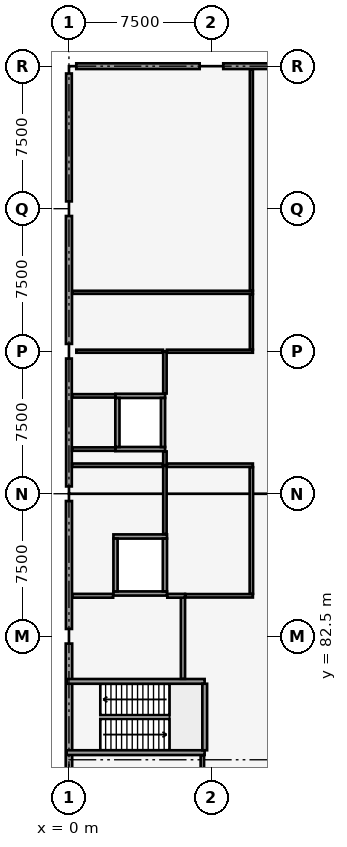
"""IFC4 building model, lengths in metres.
Left out: names, types, materials, properties, quantities, classifications, styles, units other than length and angle.
Written with IfcOpenShell. Run it as: python <this file> out.ifc"""

import sys

from ifc_helpers import new_model, si_unit, direction, frame, frame_2d, origin, origin_2d, place, context, subcontext, project, spatial, rectangle, extrude, element, fill, save


model = new_model("IFC4")
c1 = context("Model", 3, precision=1e-05, world=origin(), true_north=direction((0.0, 1.0)))
c2 = subcontext(c1, "Body", "Model", "MODEL_VIEW")
j1 = project(units=[si_unit("LENGTHUNIT", "METRE"), si_unit("PLANEANGLEUNIT", "RADIAN")], contexts=[c1])
p1 = place(None, origin())
s1 = spatial("IfcSite", under=j1, at=p1, CompositionType="ELEMENT")
p2 = place(p1, origin())
s2 = spatial("IfcBuilding", under=s1, at=p2, CompositionType="ELEMENT")
p3 = place(p2, origin())
s3 = spatial("IfcBuildingStorey", under=s2, at=p3, CompositionType="ELEMENT", Elevation=0.0)
for number, where, z_axis, x_axis in (
    (1, (0.0, 82.5, 0.0), (0.0, 0.0, 1.0), (1.0, 0.0, 0.0)),
    (2, (0.0, 90.0, 0.0), (0.0, 0.0, 1.0), (1.0, 0.0, 0.0)),
    (3, (0.0, 97.5, 0.0), (0.0, 0.0, 1.0), (1.0, 0.0, 0.0)),
    (4, (0.0, 105.0, 0.0), (0.0, 0.0, 1.0), (1.0, 0.0, 0.0)),
    (5, (0.0, 112.5, 0.0), (0.0, 0.0, 1.0), (1.0, 0.0, 0.0)),
):
    element("IfcColumn", number, at=place(p3, frame(where, z_axis=z_axis, x_axis=x_axis)), inside=s3, PredefinedType="COLUMN", context=c2, shape_type="SweptSolid", body=[
        extrude(rectangle(XDim=0.75, YDim=0.75, at=origin_2d()), origin(), (0.0, 0.0, 1.0), 4.8),
    ])
p4 = place(p3, frame((0.0, 101.25, 0.0), z_axis=(0.0, 0.0, 1.0), x_axis=(1.0, 0.0, 0.0)))
e6 = element("IfcColumn", 6, at=p4, inside=s3, PredefinedType="PILASTER", context=c2, shape_type="SweptSolid", body=[
    extrude(rectangle(XDim=0.45, YDim=0.85, at=origin_2d()), origin(), (0.0, 0.0, 1.0), 4.8),
])
p5 = place(p3, frame((0.385, 112.5, 0.0), z_axis=(0.0, 0.0, 1.0), x_axis=(1.0, 0.0, 0.0)))
e7 = element("IfcWall", 7, at=p5, inside=s3, PredefinedType="SOLIDWALL", context=c2, shape_type="SweptSolid", body=[
    extrude(rectangle(XDim=6.495, YDim=0.3, at=frame_2d((3.248, 0.0))), origin(), (0.0, 0.0, 1.0), 2.97),
])
p6 = place(p5, frame((2.815, 0.0, 0.6)))
e8 = element("IfcOpeningElement", 8, at=p6, cuts=e7, PredefinedType="OPENING", context=c2, shape_type="SweptSolid", body=[
    extrude(rectangle(XDim=1.1, YDim=1.8, at=frame_2d((0.55, 0.9))), frame((0.0, 0.16, 0.0), z_axis=(0.0, -1.0, 0.0), x_axis=(1.0, 0.0, 0.0)), (0.0, 0.0, 1.0), 0.32),
])
p7 = place(p3, frame((8.12, 112.5, 0.0), z_axis=(0.0, 0.0, 1.0), x_axis=(1.0, 0.0, 0.0)))
e9 = element("IfcWall", 9, at=p7, inside=s3, PredefinedType="SOLIDWALL", context=c2, shape_type="SweptSolid", body=[
    extrude(rectangle(XDim=6.495, YDim=0.3, at=frame_2d((3.248, 0.0))), origin(), (0.0, 0.0, 1.0), 2.97),
])
p8 = place(p7, frame((2.505, 0.0, 0.6)))
e10 = element("IfcOpeningElement", 10, at=p8, cuts=e9, PredefinedType="OPENING", context=c2, shape_type="SweptSolid", body=[
    extrude(rectangle(XDim=1.25, YDim=1.8, at=frame_2d((0.625, 0.9))), frame((0.0, 0.16, 0.0), z_axis=(0.0, -1.0, 0.0), x_axis=(1.0, 0.0, 0.0)), (0.0, 0.0, 1.0), 0.32),
])
p9 = place(p3, frame((0.0, 75.385, 0.0), z_axis=(0.0, 0.0, 1.0), x_axis=(0.0, 1.0, 0.0)))
e11 = element("IfcWall", 11, at=p9, inside=s3, PredefinedType="SOLIDWALL", context=c2, shape_type="SweptSolid", body=[
    extrude(rectangle(XDim=6.73, YDim=0.34, at=frame_2d((3.365, 0.0))), origin(), (0.0, 0.0, 1.0), 2.97),
])
p10 = place(p9, frame((2.152, 0.0, 0.0)))
e12 = element("IfcOpeningElement", 12, at=p10, cuts=e11, PredefinedType="OPENING", context=c2, shape_type="SweptSolid", body=[
    extrude(rectangle(XDim=1.8, YDim=2.2, at=frame_2d((0.9, 1.1))), frame((0.0, 0.18, 0.0), z_axis=(0.0, -1.0, 0.0), x_axis=(1.0, 0.0, 0.0)), (0.0, 0.0, 1.0), 0.36),
])
p11 = place(p3, frame((0.0, 82.885, 0.0), z_axis=(0.0, 0.0, 1.0), x_axis=(0.0, 1.0, 0.0)))
e13 = element("IfcWall", 13, at=p11, inside=s3, PredefinedType="SOLIDWALL", context=c2, shape_type="SweptSolid", body=[
    extrude(rectangle(XDim=6.73, YDim=0.32, at=frame_2d((3.365, 0.0))), origin(), (0.0, 0.0, 1.0), 2.97),
])
p12 = place(p3, frame((0.0, 90.385, 0.0), z_axis=(0.0, 0.0, 1.0), x_axis=(0.0, 1.0, 0.0)))
e14 = element("IfcWall", 14, at=p12, inside=s3, PredefinedType="SOLIDWALL", context=c2, shape_type="SweptSolid", body=[
    extrude(rectangle(XDim=6.73, YDim=0.3, at=frame_2d((3.365, 0.0))), origin(), (0.0, 0.0, 1.0), 2.97),
])
p13 = place(p12, frame((2.665, 0.0, 0.6)))
e15 = element("IfcOpeningElement", 15, at=p13, cuts=e14, PredefinedType="OPENING", context=c2, shape_type="SweptSolid", body=[
    extrude(rectangle(XDim=1.4, YDim=1.8, at=frame_2d((0.7, 0.9))), frame((0.0, 0.16, 0.0), z_axis=(0.0, -1.0, 0.0), x_axis=(1.0, 0.0, 0.0)), (0.0, 0.0, 1.0), 0.32),
])
p14 = place(p12, frame((5.188, 0.0, 0.6)))
e16 = element("IfcOpeningElement", 16, at=p14, cuts=e14, PredefinedType="OPENING", context=c2, shape_type="SweptSolid", body=[
    extrude(rectangle(XDim=1.15, YDim=1.3, at=frame_2d((0.575, 0.65))), frame((0.0, 0.16, 0.0), z_axis=(0.0, -1.0, 0.0), x_axis=(1.0, 0.0, 0.0)), (0.0, 0.0, 1.0), 0.32),
])
p15 = place(p3, frame((0.0, 97.885, 0.0), z_axis=(0.0, 0.0, 1.0), x_axis=(0.0, 1.0, 0.0)))
e17 = element("IfcWall", 17, at=p15, inside=s3, PredefinedType="SOLIDWALL", context=c2, shape_type="SweptSolid", body=[
    extrude(rectangle(XDim=6.73, YDim=0.32, at=frame_2d((3.365, 0.0))), origin(), (0.0, 0.0, 1.0), 2.97),
])
p16 = place(p3, frame((0.0, 105.385, 0.0), z_axis=(0.0, 0.0, 1.0), x_axis=(0.0, 1.0, 0.0)))
e18 = element("IfcWall", 18, at=p16, inside=s3, PredefinedType="SOLIDWALL", context=c2, shape_type="SweptSolid", body=[
    extrude(rectangle(XDim=6.73, YDim=0.3, at=frame_2d((3.365, 0.0))), origin(), (0.0, 0.0, 1.0), 2.97),
])
p17 = place(p16, frame((0.95, 0.0, 0.6)))
e19 = element("IfcOpeningElement", 19, at=p17, cuts=e18, PredefinedType="OPENING", context=c2, shape_type="SweptSolid", body=[
    extrude(rectangle(XDim=1.7, YDim=1.8, at=frame_2d((0.85, 0.9))), frame((0.0, 0.16, 0.0), z_axis=(0.0, -1.0, 0.0), x_axis=(1.0, 0.0, 0.0)), (0.0, 0.0, 1.0), 0.32),
])
p18 = place(p16, frame((4.205, 0.0, 0.6)))
e20 = element("IfcOpeningElement", 20, at=p18, cuts=e18, PredefinedType="OPENING", context=c2, shape_type="SweptSolid", body=[
    extrude(rectangle(XDim=1.45, YDim=1.3, at=frame_2d((0.725, 0.65))), frame((0.0, 0.16, 0.0), z_axis=(0.0, -1.0, 0.0), x_axis=(1.0, 0.0, 0.0)), (0.0, 0.0, 1.0), 0.32),
])
p19 = place(p3, frame((-0.12, 76.375, 0.0), z_axis=(0.0, 0.0, 1.0), x_axis=(1.0, 0.0, 0.0)))
e21 = element("IfcWall", 21, at=p19, inside=s3, PredefinedType="SOLIDWALL", context=c2, shape_type="SweptSolid", body=[
    extrude(rectangle(XDim=7.26, YDim=0.25, at=frame_2d((3.63, 0.0))), origin(), (0.0, 0.0, 1.0), 4.5),
])
p20 = place(p3, frame((-0.12, 80.125, 0.0), z_axis=(0.0, 0.0, 1.0), x_axis=(1.0, 0.0, 0.0)))
e22 = element("IfcWall", 22, at=p20, inside=s3, PredefinedType="SOLIDWALL", context=c2, shape_type="SweptSolid", body=[
    extrude(rectangle(XDim=7.26, YDim=0.25, at=frame_2d((3.63, 0.0))), origin(), (0.0, 0.0, 1.0), 4.5),
])
p21 = place(p20, frame((0.45, 0.0, 0.0)))
e23 = element("IfcOpeningElement", 23, at=p21, cuts=e22, PredefinedType="OPENING", context=c2, shape_type="SweptSolid", body=[
    extrude(rectangle(XDim=1.1, YDim=2.15, at=frame_2d((0.55, 1.075))), frame((0.0, 0.135, 0.0), z_axis=(0.0, -1.0, 0.0), x_axis=(1.0, 0.0, 0.0)), (0.0, 0.0, 1.0), 0.27),
])
p22 = place(p3, frame((7.145, 76.5, 0.0), z_axis=(0.0, 0.0, 1.0), x_axis=(0.0, 1.0, 0.0)))
e24 = element("IfcWall", 24, at=p22, inside=s3, PredefinedType="SOLIDWALL", context=c2, shape_type="SweptSolid", body=[
    extrude(rectangle(XDim=3.5, YDim=0.25, at=frame_2d((1.75, 0.0))), origin(), (0.0, 0.0, 1.0), 4.5),
])
for number, where, z_axis, x_axis in (
    (25, (2.44, 92.35, 0.0), (0.0, 0.0, 1.0), (1.0, 0.0, 0.0)),
    (26, (2.44, 95.15, 0.0), (0.0, 0.0, 1.0), (1.0, 0.0, 0.0)),
):
    element("IfcWall", number, at=place(p3, frame(where, z_axis=z_axis, x_axis=x_axis)), inside=s3, PredefinedType="SOLIDWALL", context=c2, shape_type="SweptSolid", body=[
        extrude(rectangle(XDim=2.62, YDim=0.22, at=frame_2d((1.31, 0.0))), origin(), (0.0, 0.0, 1.0), 4.5),
    ])
p23 = place(p3, frame((2.55, 92.46, 0.0), z_axis=(0.0, 0.0, 1.0), x_axis=(0.0, 1.0, 0.0)))
e27 = element("IfcWall", 27, at=p23, inside=s3, PredefinedType="SOLIDWALL", context=c2, shape_type="SweptSolid", body=[
    extrude(rectangle(XDim=2.58, YDim=0.22, at=frame_2d((1.29, 0.0))), origin(), (0.0, 0.0, 1.0), 4.5),
])
p24 = place(p3, frame((4.95, 92.46, 0.0), z_axis=(0.0, 0.0, 1.0), x_axis=(0.0, 1.0, 0.0)))
e28 = element("IfcWall", 28, at=p24, inside=s3, PredefinedType="SOLIDWALL", context=c2, shape_type="SweptSolid", body=[
    extrude(rectangle(XDim=2.58, YDim=0.22, at=frame_2d((1.29, 0.0))), origin(), (0.0, 0.0, 1.0), 4.5),
])
p25 = place(p24, frame((0.79, 0.0, 0.0)))
e29 = element("IfcOpeningElement", 29, at=p25, cuts=e28, PredefinedType="OPENING", context=c2, shape_type="SweptSolid", body=[
    extrude(rectangle(XDim=1.0, YDim=2.15, at=frame_2d((0.5, 1.075))), frame((0.0, 0.12, 0.0), z_axis=(0.0, -1.0, 0.0), x_axis=(1.0, 0.0, 0.0)), (0.0, 0.0, 1.0), 0.24),
])
p26 = place(p3, frame((2.34, 84.75, 0.0), z_axis=(0.0, 0.0, 1.0), x_axis=(1.0, 0.0, 0.0)))
e30 = element("IfcWall", 30, at=p26, inside=s3, PredefinedType="SOLIDWALL", context=c2, shape_type="SweptSolid", body=[
    extrude(rectangle(XDim=2.82, YDim=0.22, at=frame_2d((1.41, 0.0))), origin(), (0.0, 0.0, 1.0), 4.5),
])
p27 = place(p26, frame((0.86, 0.0, 0.0)))
e31 = element("IfcOpeningElement", 31, at=p27, cuts=e30, PredefinedType="OPENING", context=c2, shape_type="SweptSolid", body=[
    extrude(rectangle(XDim=1.1, YDim=2.15, at=frame_2d((0.55, 1.075))), frame((0.0, 0.12, 0.0), z_axis=(0.0, -1.0, 0.0), x_axis=(1.0, 0.0, 0.0)), (0.0, 0.0, 1.0), 0.24),
])
p28 = place(p3, frame((2.34, 87.75, 0.0), z_axis=(0.0, 0.0, 1.0), x_axis=(1.0, 0.0, 0.0)))
e32 = element("IfcWall", 32, at=p28, inside=s3, PredefinedType="SOLIDWALL", context=c2, shape_type="SweptSolid", body=[
    extrude(rectangle(XDim=2.82, YDim=0.22, at=frame_2d((1.41, 0.0))), origin(), (0.0, 0.0, 1.0), 4.5),
])
for number, where, z_axis, x_axis in (
    (33, (2.45, 84.86, 0.0), (0.0, 0.0, 1.0), (0.0, 1.0, 0.0)),
    (34, (5.05, 84.86, 0.0), (0.0, 0.0, 1.0), (0.0, 1.0, 0.0)),
):
    element("IfcWall", number, at=place(p3, frame(where, z_axis=z_axis, x_axis=x_axis)), inside=s3, PredefinedType="SOLIDWALL", context=c2, shape_type="SweptSolid", body=[
        extrude(rectangle(XDim=2.78, YDim=0.22, at=frame_2d((1.39, 0.0))), origin(), (0.0, 0.0, 1.0), 4.5),
    ])
p29 = place(p3, frame((6.0, 80.26, 0.0), z_axis=(0.0, 0.0, 1.0), x_axis=(0.0, 1.0, 0.0)))
e35 = element("IfcWall", 35, at=p29, inside=s3, PredefinedType="SOLIDWALL", context=c2, shape_type="SweptSolid", body=[
    extrude(rectangle(XDim=4.37, YDim=0.22, at=frame_2d((2.185, 0.0))), origin(), (0.0, 0.0, 1.0), 4.5),
])
p30 = place(p29, frame((0.45, 0.0, 0.0)))
e36 = element("IfcOpeningElement", 36, at=p30, cuts=e35, PredefinedType="OPENING", context=c2, shape_type="SweptSolid", body=[
    extrude(rectangle(XDim=1.1, YDim=2.15, at=frame_2d((0.55, 1.075))), frame((0.0, 0.12, 0.0), z_axis=(0.0, -1.0, 0.0), x_axis=(1.0, 0.0, 0.0)), (0.0, 0.0, 1.0), 0.24),
])
p31 = place(p3, frame((0.18, 84.63, 0.0), z_axis=(0.0, 0.0, 1.0), x_axis=(1.0, 0.0, 0.0)))
e37 = element("IfcWall", 37, at=p31, inside=s3, PredefinedType="PARTITIONING", context=c2, shape_type="SweptSolid", body=[
    extrude(rectangle(XDim=2.145, YDim=0.2, at=frame_2d((1.073, 0.0))), origin(), (0.0, 0.0, 1.0), 3.88),
])
p32 = place(p3, frame((5.175, 84.63, 0.0), z_axis=(0.0, 0.0, 1.0), x_axis=(1.0, 0.0, 0.0)))
e38 = element("IfcWall", 38, at=p32, inside=s3, PredefinedType="PARTITIONING", context=c2, shape_type="SweptSolid", body=[
    extrude(rectangle(XDim=0.935, YDim=0.2, at=frame_2d((0.468, 0.0))), origin(), (0.0, 0.0, 1.0), 4.08),
])
p33 = place(p3, frame((7.02, 75.0, 0.0), z_axis=(0.0, 0.0, 1.0), x_axis=(0.0, 1.0, 0.0)))
e39 = element("IfcWall", 39, at=p33, inside=s3, PredefinedType="PARTITIONING", context=c2, shape_type="SweptSolid", body=[
    extrude(rectangle(XDim=1.236, YDim=0.18, at=frame_2d((0.618, 0.0))), origin(), (0.0, 0.0, 1.0), 2.97),
])
p34 = place(p3, frame((5.05, 87.874, 0.0), z_axis=(0.0, 0.0, 1.0), x_axis=(0.0, 1.0, 0.0)))
e40 = element("IfcWall", 40, at=p34, inside=s3, PredefinedType="PARTITIONING", context=c2, shape_type="SweptSolid", body=[
    extrude(rectangle(XDim=3.626, YDim=0.18, at=frame_2d((1.813, 0.0))), origin(), (0.0, 0.0, 1.0), 2.97),
])
p35 = place(p3, frame((6.124, 84.63, 0.0), z_axis=(0.0, 0.0, 1.0), x_axis=(1.0, 0.0, 0.0)))
e41 = element("IfcWall", 41, at=p35, inside=s3, PredefinedType="PARTITIONING", context=c2, shape_type="SweptSolid", body=[
    extrude(rectangle(XDim=3.556, YDim=0.18, at=frame_2d((1.778, 0.0))), origin(), (0.0, 0.0, 1.0), 3.87),
])
p36 = place(p3, frame((0.164, 91.5, 0.0), z_axis=(0.0, 0.0, 1.0), x_axis=(1.0, 0.0, 0.0)))
e42 = element("IfcWall", 42, at=p36, inside=s3, PredefinedType="PARTITIONING", context=c2, shape_type="SweptSolid", body=[
    extrude(rectangle(XDim=4.782, YDim=0.18, at=frame_2d((2.391, 0.0))), origin(), (0.0, 0.0, 1.0), 3.72),
])
p37 = place(p3, frame((5.154, 91.5, 0.0), z_axis=(0.0, 0.0, 1.0), x_axis=(1.0, 0.0, 0.0)))
e43 = element("IfcWall", 43, at=p37, inside=s3, PredefinedType="PARTITIONING", context=c2, shape_type="SweptSolid", body=[
    extrude(rectangle(XDim=4.526, YDim=0.18, at=frame_2d((2.263, 0.0))), origin(), (0.0, 0.0, 1.0), 3.87),
])
p38 = place(p3, frame((9.6, 84.734, 0.0), z_axis=(0.0, 0.0, 1.0), x_axis=(0.0, 1.0, 0.0)))
e44 = element("IfcWall", 44, at=p38, inside=s3, PredefinedType="PARTITIONING", context=c2, shape_type="SweptSolid", body=[
    extrude(rectangle(XDim=6.662, YDim=0.18, at=frame_2d((3.331, 0.0))), origin(), (0.0, 0.0, 1.0), 2.97),
])
p39 = place(p38, frame((2.241, 0.0, 0.0)))
e45 = element("IfcOpeningElement", 45, at=p39, cuts=e44, PredefinedType="OPENING", context=c2, shape_type="SweptSolid", body=[
    extrude(rectangle(XDim=1.05, YDim=2.12, at=frame_2d((0.525, 1.06))), frame((0.0, 0.1, 0.0), z_axis=(0.0, -1.0, 0.0), x_axis=(1.0, 0.0, 0.0)), (0.0, 0.0, 1.0), 0.2),
])
for number, where, z_axis, x_axis in (
    (46, (0.164, 92.35, 0.0), (0.0, 0.0, 1.0), (1.0, 0.0, 0.0)),
    (47, (0.164, 95.15, 0.0), (0.0, 0.0, 1.0), (1.0, 0.0, 0.0)),
):
    element("IfcWall", number, at=place(p3, frame(where, z_axis=z_axis, x_axis=x_axis)), inside=s3, PredefinedType="PARTITIONING", context=c2, shape_type="SweptSolid", body=[
        extrude(rectangle(XDim=2.276, YDim=0.18, at=frame_2d((1.138, 0.0))), origin(), (0.0, 0.0, 1.0), 3.72),
    ])
p40 = place(p3, frame((5.05, 91.5, 0.0), z_axis=(0.0, 0.0, 1.0), x_axis=(0.0, 1.0, 0.0)))
e48 = element("IfcWall", 48, at=p40, inside=s3, PredefinedType="PARTITIONING", context=c2, shape_type="SweptSolid", body=[
    extrude(rectangle(XDim=0.726, YDim=0.18, at=frame_2d((0.363, 0.0))), origin(), (0.0, 0.0, 1.0), 3.87),
])
p41 = place(p3, frame((5.05, 95.274, 0.0), z_axis=(0.0, 0.0, 1.0), x_axis=(0.0, 1.0, 0.0)))
e49 = element("IfcWall", 49, at=p41, inside=s3, PredefinedType="PARTITIONING", context=c2, shape_type="SweptSolid", body=[
    extrude(rectangle(XDim=2.226, YDim=0.18, at=frame_2d((1.113, 0.0))), origin(), (0.0, 0.0, 1.0), 2.97),
])
p42 = place(p3, frame((0.389, 97.5, 0.0), z_axis=(0.0, 0.0, 1.0), x_axis=(1.0, 0.0, 0.0)))
e50 = element("IfcWall", 50, at=p42, inside=s3, PredefinedType="PARTITIONING", context=c2, shape_type="SweptSolid", body=[
    extrude(rectangle(XDim=4.557, YDim=0.16, at=frame_2d((2.279, 0.0))), origin(), (0.0, 0.0, 1.0), 2.97),
])
p43 = place(p3, frame((5.154, 97.5, 0.0), z_axis=(0.0, 0.0, 1.0), x_axis=(1.0, 0.0, 0.0)))
e51 = element("IfcWall", 51, at=p43, inside=s3, PredefinedType="PARTITIONING", context=c2, shape_type="SweptSolid", body=[
    extrude(rectangle(XDim=4.526, YDim=0.16, at=frame_2d((2.263, 0.0))), origin(), (0.0, 0.0, 1.0), 2.97),
])
p44 = place(p3, frame((0.174, 100.6, 0.0), z_axis=(0.0, 0.0, 1.0), x_axis=(1.0, 0.0, 0.0)))
e52 = element("IfcWall", 52, at=p44, inside=s3, PredefinedType="PARTITIONING", context=c2, shape_type="SweptSolid", body=[
    extrude(rectangle(XDim=9.506, YDim=0.16, at=frame_2d((4.753, 0.0))), origin(), (0.0, 0.0, 1.0), 3.72),
])
p45 = place(p3, frame((9.6, 97.594, 0.0), z_axis=(0.0, 0.0, 1.0), x_axis=(0.0, 1.0, 0.0)))
e53 = element("IfcWall", 53, at=p45, inside=s3, PredefinedType="PARTITIONING", context=c2, shape_type="SweptSolid", body=[
    extrude(rectangle(XDim=2.912, YDim=0.16, at=frame_2d((1.456, 0.0))), origin(), (0.0, 0.0, 1.0), 2.97),
])
p46 = place(p45, frame((0.981, 0.0, 0.0)))
e54 = element("IfcOpeningElement", 54, at=p46, cuts=e53, PredefinedType="OPENING", context=c2, shape_type="SweptSolid", body=[
    extrude(rectangle(XDim=0.95, YDim=2.1, at=frame_2d((0.475, 1.05))), frame((0.0, 0.09, 0.0), z_axis=(0.0, -1.0, 0.0), x_axis=(1.0, 0.0, 0.0)), (0.0, 0.0, 1.0), 0.18),
])
p47 = place(p3, frame((9.6, 100.694, 0.0), z_axis=(0.0, 0.0, 1.0), x_axis=(0.0, 1.0, 0.0)))
e55 = element("IfcWall", 55, at=p47, inside=s3, PredefinedType="PARTITIONING", context=c2, shape_type="SweptSolid", body=[
    extrude(rectangle(XDim=11.642, YDim=0.16, at=frame_2d((5.821, 0.0))), origin(), (0.0, 0.0, 1.0), 2.97),
])
p48 = place(p47, frame((5.281, 0.0, 0.0)))
e56 = element("IfcOpeningElement", 56, at=p48, cuts=e55, PredefinedType="OPENING", context=c2, shape_type="SweptSolid", body=[
    extrude(rectangle(XDim=1.05, YDim=2.12, at=frame_2d((0.525, 1.06))), frame((0.0, 0.09, 0.0), z_axis=(0.0, -1.0, 0.0), x_axis=(1.0, 0.0, 0.0)), (0.0, 0.0, 1.0), 0.18),
])
p49 = place(p6, origin())
e57 = element("IfcWindow", 57, at=p49, inside=s3, PartitioningType="SINGLE_PANEL", PredefinedType="WINDOW", context=c2, shape_type="SweptSolid", body=[
    extrude(rectangle(XDim=1.1, YDim=1.8, at=frame_2d((0.55, 0.9))), frame((0.0, 0.03, 0.0), z_axis=(0.0, -1.0, 0.0), x_axis=(1.0, 0.0, 0.0)), (0.0, 0.0, 1.0), 0.06),
])
fill(e8, e57)
p50 = place(p10, origin())
e58 = element("IfcDoor", 58, at=p50, inside=s3, OperationType="SINGLE_SWING_RIGHT", PredefinedType="DOOR", context=c2, shape_type="SweptSolid", body=[
    extrude(rectangle(XDim=1.8, YDim=2.2, at=frame_2d((0.9, 1.1))), frame((0.0, 0.025, 0.0), z_axis=(0.0, -1.0, 0.0), x_axis=(1.0, 0.0, 0.0)), (0.0, 0.0, 1.0), 0.05),
])
fill(e12, e58)
p51 = place(p13, origin())
e59 = element("IfcWindow", 59, at=p51, inside=s3, PartitioningType="SINGLE_PANEL", PredefinedType="WINDOW", context=c2, shape_type="SweptSolid", body=[
    extrude(rectangle(XDim=1.4, YDim=1.8, at=frame_2d((0.7, 0.9))), frame((0.0, 0.03, 0.0), z_axis=(0.0, -1.0, 0.0), x_axis=(1.0, 0.0, 0.0)), (0.0, 0.0, 1.0), 0.06),
])
fill(e15, e59)
p52 = place(p14, origin())
e60 = element("IfcWindow", 60, at=p52, inside=s3, PartitioningType="SINGLE_PANEL", PredefinedType="WINDOW", context=c2, shape_type="SweptSolid", body=[
    extrude(rectangle(XDim=1.15, YDim=1.3, at=frame_2d((0.575, 0.65))), frame((0.0, 0.03, 0.0), z_axis=(0.0, -1.0, 0.0), x_axis=(1.0, 0.0, 0.0)), (0.0, 0.0, 1.0), 0.06),
])
fill(e16, e60)
p53 = place(p17, origin())
e61 = element("IfcWindow", 61, at=p53, inside=s3, PartitioningType="SINGLE_PANEL", PredefinedType="WINDOW", context=c2, shape_type="SweptSolid", body=[
    extrude(rectangle(XDim=1.7, YDim=1.8, at=frame_2d((0.85, 0.9))), frame((0.0, 0.03, 0.0), z_axis=(0.0, -1.0, 0.0), x_axis=(1.0, 0.0, 0.0)), (0.0, 0.0, 1.0), 0.06),
])
fill(e19, e61)
p54 = place(p18, origin())
e62 = element("IfcWindow", 62, at=p54, inside=s3, PartitioningType="SINGLE_PANEL", PredefinedType="WINDOW", context=c2, shape_type="SweptSolid", body=[
    extrude(rectangle(XDim=1.45, YDim=1.3, at=frame_2d((0.725, 0.65))), frame((0.0, 0.03, 0.0), z_axis=(0.0, -1.0, 0.0), x_axis=(1.0, 0.0, 0.0)), (0.0, 0.0, 1.0), 0.06),
])
fill(e20, e62)
p55 = place(p21, origin())
e63 = element("IfcDoor", 63, at=p55, inside=s3, OperationType="SINGLE_SWING_RIGHT", PredefinedType="DOOR", context=c2, shape_type="SweptSolid", body=[
    extrude(rectangle(XDim=1.1, YDim=2.15, at=frame_2d((0.55, 1.075))), frame((0.0, 0.025, 0.0), z_axis=(0.0, -1.0, 0.0), x_axis=(1.0, 0.0, 0.0)), (0.0, 0.0, 1.0), 0.05),
])
fill(e23, e63)
p56 = place(p25, origin())
e64 = element("IfcDoor", 64, at=p56, inside=s3, OperationType="SLIDING_TO_LEFT", PredefinedType="DOOR", context=c2, shape_type="SweptSolid", body=[
    extrude(rectangle(XDim=1.0, YDim=2.15, at=frame_2d((0.5, 1.075))), frame((0.0, 0.025, 0.0), z_axis=(0.0, -1.0, 0.0), x_axis=(1.0, 0.0, 0.0)), (0.0, 0.0, 1.0), 0.05),
])
fill(e29, e64)
p57 = place(p27, origin())
e65 = element("IfcDoor", 65, at=p57, inside=s3, OperationType="SLIDING_TO_LEFT", PredefinedType="DOOR", context=c2, shape_type="SweptSolid", body=[
    extrude(rectangle(XDim=1.1, YDim=2.15, at=frame_2d((0.55, 1.075))), frame((0.0, 0.025, 0.0), z_axis=(0.0, -1.0, 0.0), x_axis=(1.0, 0.0, 0.0)), (0.0, 0.0, 1.0), 0.05),
])
fill(e31, e65)
p58 = place(p30, origin())
e66 = element("IfcDoor", 66, at=p58, inside=s3, OperationType="SINGLE_SWING_LEFT", PredefinedType="DOOR", context=c2, shape_type="SweptSolid", body=[
    extrude(rectangle(XDim=1.1, YDim=2.15, at=frame_2d((0.55, 1.075))), frame((0.0, 0.025, 0.0), z_axis=(0.0, -1.0, 0.0), x_axis=(1.0, 0.0, 0.0)), (0.0, 0.0, 1.0), 0.05),
])
fill(e36, e66)
p59 = place(p39, origin())
e67 = element("IfcDoor", 67, at=p59, inside=s3, OperationType="SINGLE_SWING_RIGHT", PredefinedType="DOOR", context=c2, shape_type="SweptSolid", body=[
    extrude(rectangle(XDim=1.05, YDim=2.12, at=frame_2d((0.525, 1.06))), frame((0.0, 0.025, 0.0), z_axis=(0.0, -1.0, 0.0), x_axis=(1.0, 0.0, 0.0)), (0.0, 0.0, 1.0), 0.05),
])
fill(e45, e67)
p60 = place(p46, origin())
e68 = element("IfcDoor", 68, at=p60, inside=s3, OperationType="SINGLE_SWING_LEFT", PredefinedType="DOOR", context=c2, shape_type="SweptSolid", body=[
    extrude(rectangle(XDim=0.95, YDim=2.1, at=frame_2d((0.475, 1.05))), frame((0.0, 0.025, 0.0), z_axis=(0.0, -1.0, 0.0), x_axis=(1.0, 0.0, 0.0)), (0.0, 0.0, 1.0), 0.05),
])
fill(e54, e68)
p61 = place(p48, origin())
e69 = element("IfcDoor", 69, at=p61, inside=s3, OperationType="SINGLE_SWING_RIGHT", PredefinedType="DOOR", context=c2, shape_type="SweptSolid", body=[
    extrude(rectangle(XDim=1.05, YDim=2.12, at=frame_2d((0.525, 1.06))), frame((0.0, 0.025, 0.0), z_axis=(0.0, -1.0, 0.0), x_axis=(1.0, 0.0, 0.0)), (0.0, 0.0, 1.0), 0.05),
])
fill(e56, e69)
save(model, sys.argv[1])
